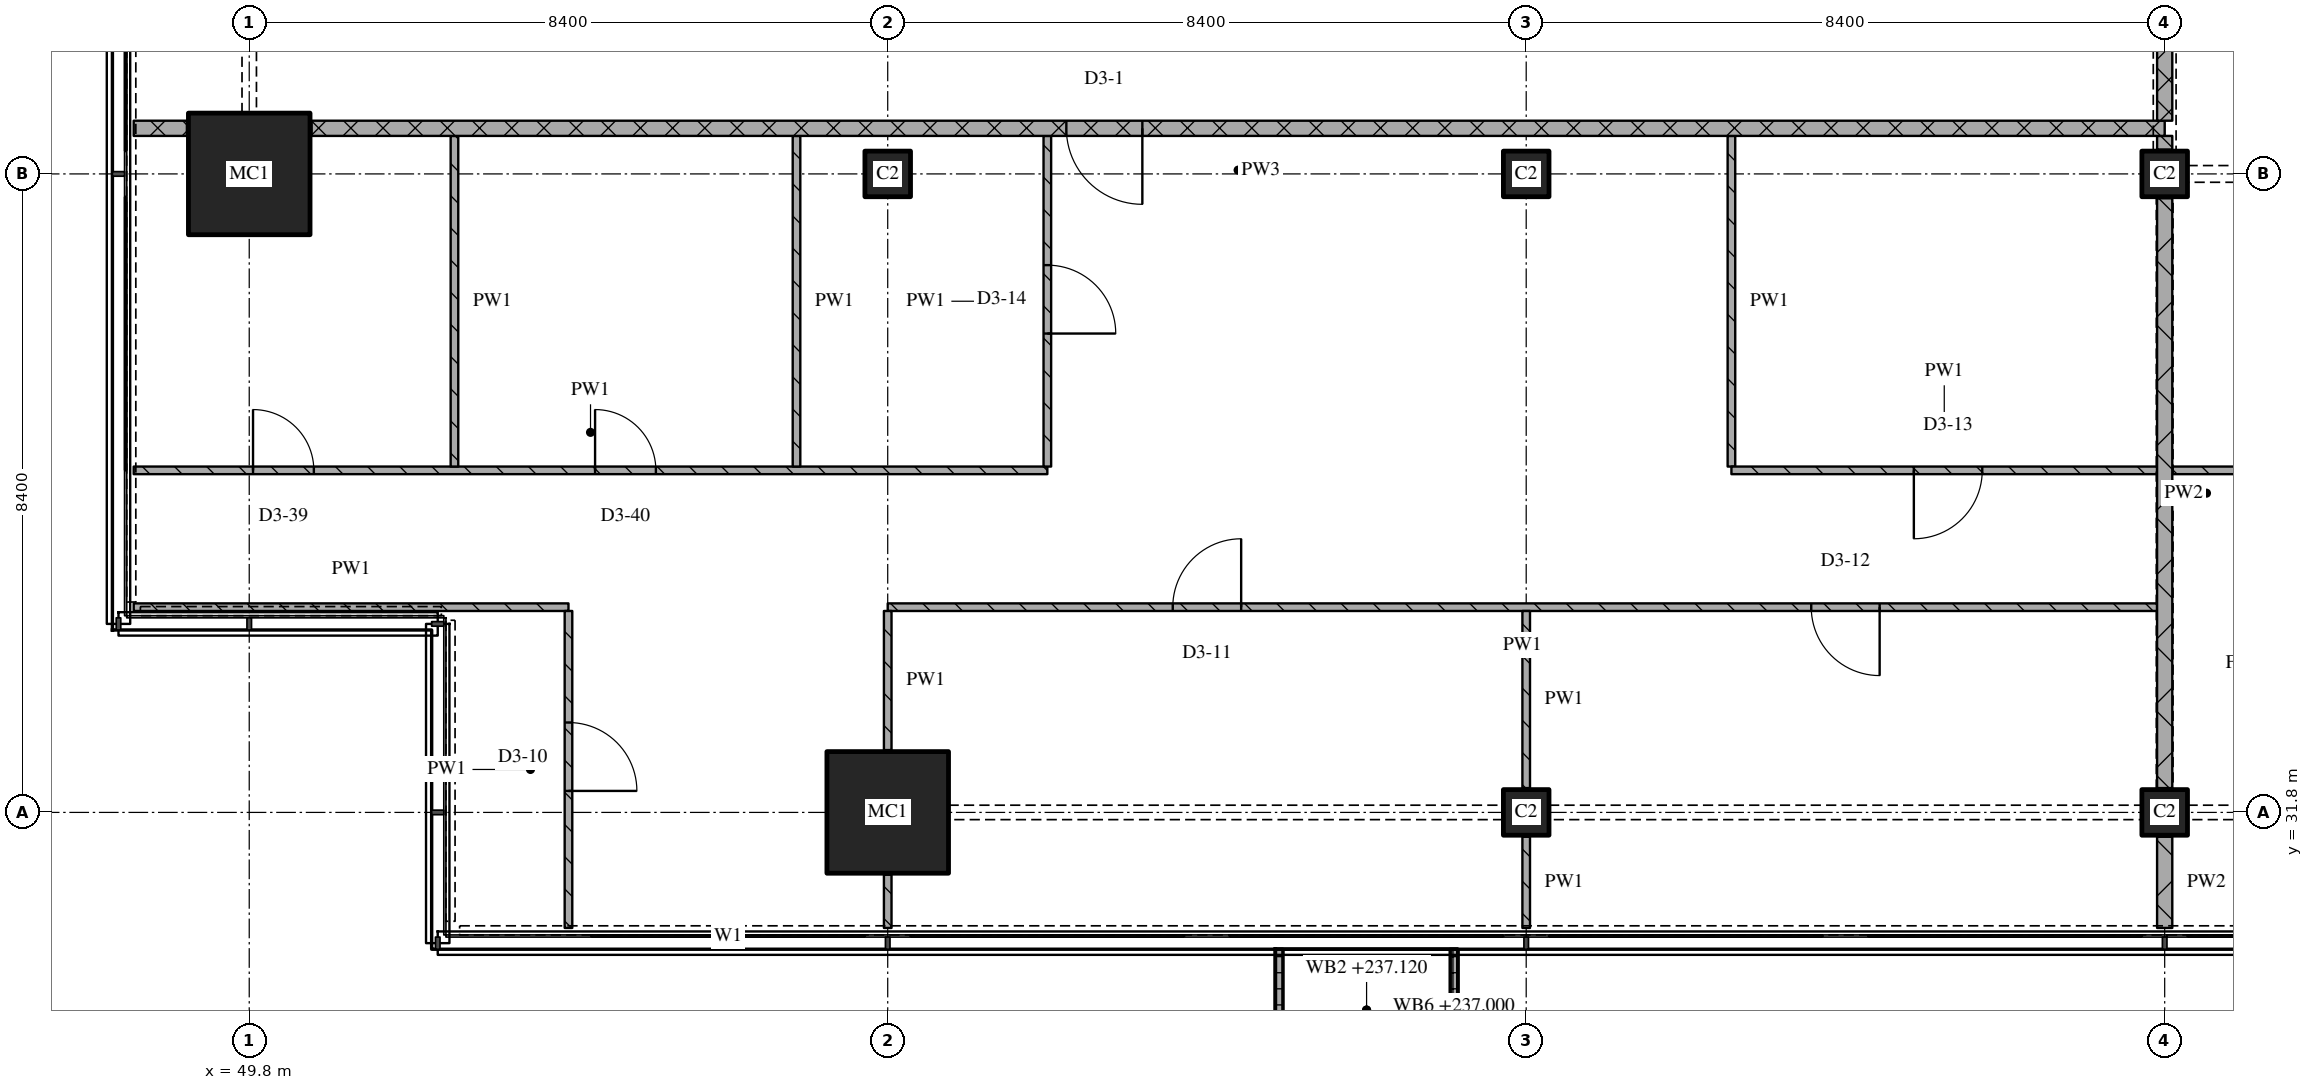
"""IFC4 building model, lengths in metres.
Left out: names, types, materials, properties, quantities, classifications, styles, units other than length and angle.
Written with IfcOpenShell. Run it as: python <this file> out.ifc"""

import sys

from ifc_helpers import new_model, si_unit, direction, frame, frame_2d, origin, origin_2d, place, context, subcontext, project, spatial, polyline, rectangle, outline, extrude, element, fill, save


model = new_model("IFC4")
c1 = context("Model", 3, precision=1e-05, world=origin(), true_north=direction((0.0, 1.0)))
c2 = subcontext(c1, "Body", "Model", "MODEL_VIEW")
j1 = project(units=[si_unit("LENGTHUNIT", "METRE"), si_unit("PLANEANGLEUNIT", "RADIAN")], contexts=[c1])
p1 = place(None, origin())
s1 = spatial("IfcSite", under=j1, at=p1, CompositionType="ELEMENT")
p2 = place(p1, origin())
s2 = spatial("IfcBuilding", under=s1, at=p2, CompositionType="ELEMENT")
p3 = place(p2, frame((0.0, 0.0, 234.3)))
s3 = spatial("IfcBuildingStorey", under=s2, at=p3, CompositionType="ELEMENT", Elevation=234.3)
for number, where, z_axis, x_axis in (
    (1, (49.8, 40.2, 0.0), (0.0, 0.0, 1.0), (1.0, 0.0, 0.0)),
    (2, (58.2, 31.8, 0.0), (0.0, 0.0, 1.0), (1.0, 0.0, 0.0)),
):
    element("IfcColumn", number, at=place(p3, frame(where, z_axis=z_axis, x_axis=x_axis)), inside=s3, PredefinedType="COLUMN", context=c2, shape_type="SweptSolid", body=[
        extrude(rectangle(XDim=1.6, YDim=1.6, at=origin_2d()), origin(), (0.0, 0.0, 1.0), 3.6),
    ])
for number, where, z_axis, x_axis in (
    (3, (58.2, 40.2, 0.0), (0.0, 0.0, 1.0), (1.0, 0.0, 0.0)),
    (4, (66.6, 31.8, 0.0), (0.0, 0.0, 1.0), (1.0, 0.0, 0.0)),
    (5, (66.6, 40.2, 0.0), (0.0, 0.0, 1.0), (1.0, 0.0, 0.0)),
    (6, (75.0, 31.8, 0.0), (0.0, 0.0, 1.0), (1.0, 0.0, 0.0)),
    (7, (75.0, 40.2, 0.0), (0.0, 0.0, 1.0), (1.0, 0.0, 0.0)),
):
    element("IfcColumn", number, at=place(p3, frame(where, z_axis=z_axis, x_axis=x_axis)), inside=s3, PredefinedType="COLUMN", context=c2, shape_type="SweptSolid", body=[
        extrude(rectangle(XDim=0.6, YDim=0.6, at=origin_2d()), origin(), (0.0, 0.0, 1.0), 3.6),
    ])
p4 = place(p3, origin())
e8 = element("IfcWall", 8, at=p4, inside=s3, PredefinedType="SOLIDWALL", context=c2, shape_type="SweptSolid", body=[
    extrude(outline(polyline([(63.3, 30.0), (63.4, 30.0), (63.4, 28.5), (65.6, 28.5), (65.6, 30.0), (65.7, 30.0), (65.7, 28.4), (63.3, 28.4), (63.3, 30.0)])), origin(), (0.0, 0.0, 1.0), 1.0),
])
p5 = place(p3, frame((48.28, 34.5, 0.0), z_axis=(0.0, 0.0, 1.0), x_axis=(1.0, 0.0, 0.0)))
e9 = element("IfcWall", 9, at=p5, inside=s3, PredefinedType="PARTITIONING", context=c2, shape_type="SweptSolid", body=[
    extrude(rectangle(XDim=5.72, YDim=0.1, at=frame_2d((2.86, 0.0))), origin(), (0.0, 0.0, 1.0), 3.32),
])
p6 = place(p3, frame((74.9, 34.5, 0.0), z_axis=(0.0, 0.0, 1.0), x_axis=(-1.0, 0.0, 0.0)))
e10 = element("IfcWall", 10, at=p6, inside=s3, PredefinedType="PARTITIONING", context=c2, shape_type="SweptSolid", body=[
    extrude(rectangle(XDim=16.7, YDim=0.1, at=frame_2d((8.35, 0.0))), origin(), (0.0, 0.0, 1.0), 3.32),
])
p7 = place(p6, frame((3.65, 0.0, 0.0)))
e11 = element("IfcOpeningElement", 11, at=p7, cuts=e10, PredefinedType="OPENING", context=c2, shape_type="SweptSolid", body=[
    extrude(rectangle(XDim=0.9, YDim=2.1, at=frame_2d((0.45, 1.05))), frame((0.0, 0.06, 0.0), z_axis=(0.0, -1.0, 0.0), x_axis=(1.0, 0.0, 0.0)), (0.0, 0.0, 1.0), 0.12),
])
p8 = place(p6, frame((12.05, 0.0, 0.0)))
e12 = element("IfcOpeningElement", 12, at=p8, cuts=e10, PredefinedType="OPENING", context=c2, shape_type="SweptSolid", body=[
    extrude(rectangle(XDim=0.9, YDim=2.1, at=frame_2d((0.45, 1.05))), frame((0.0, 0.06, 0.0), z_axis=(0.0, -1.0, 0.0), x_axis=(1.0, 0.0, 0.0)), (0.0, 0.0, 1.0), 0.12),
])
p9 = place(p3, frame((48.28, 36.3, 0.0), z_axis=(0.0, 0.0, 1.0), x_axis=(1.0, 0.0, 0.0)))
e13 = element("IfcWall", 13, at=p9, inside=s3, PredefinedType="PARTITIONING", context=c2, shape_type="SweptSolid", body=[
    extrude(rectangle(XDim=12.02, YDim=0.1, at=frame_2d((6.01, 0.0))), origin(), (0.0, 0.0, 1.0), 3.32),
])
p10 = place(p9, frame((1.57, 0.0, 0.0)))
e14 = element("IfcOpeningElement", 14, at=p10, cuts=e13, PredefinedType="OPENING", context=c2, shape_type="SweptSolid", body=[
    extrude(rectangle(XDim=0.8, YDim=2.1, at=frame_2d((0.4, 1.05))), frame((0.0, 0.06, 0.0), z_axis=(0.0, -1.0, 0.0), x_axis=(1.0, 0.0, 0.0)), (0.0, 0.0, 1.0), 0.12),
])
p11 = place(p9, frame((6.07, 0.0, 0.0)))
e15 = element("IfcOpeningElement", 15, at=p11, cuts=e13, PredefinedType="OPENING", context=c2, shape_type="SweptSolid", body=[
    extrude(rectangle(XDim=0.8, YDim=2.1, at=frame_2d((0.4, 1.05))), frame((0.0, 0.06, 0.0), z_axis=(0.0, -1.0, 0.0), x_axis=(1.0, 0.0, 0.0)), (0.0, 0.0, 1.0), 0.12),
])
p12 = place(p3, frame((48.28, 40.8, 0.0), z_axis=(0.0, 0.0, 1.0), x_axis=(1.0, 0.0, 0.0)))
e16 = element("IfcWall", 16, at=p12, inside=s3, PredefinedType="PARTITIONING", context=c2, shape_type="SweptSolid", body=[
    extrude(rectangle(XDim=0.7, YDim=0.2, at=frame_2d((0.35, 0.0))), origin(), (0.0, 0.0, 1.0), 3.32),
])
p13 = place(p3, frame((75.0, 40.8, 0.0), z_axis=(0.0, 0.0, 1.0), x_axis=(-1.0, 0.0, 0.0)))
e17 = element("IfcWall", 17, at=p13, inside=s3, PredefinedType="PARTITIONING", context=c2, shape_type="SweptSolid", body=[
    extrude(rectangle(XDim=24.38, YDim=0.2, at=frame_2d((12.19, 0.0))), origin(), (0.0, 0.0, 1.0), 3.32),
])
p14 = place(p13, frame((13.45, 0.0, 0.0)))
e18 = element("IfcOpeningElement", 18, at=p14, cuts=e17, PredefinedType="OPENING", context=c2, shape_type="SweptSolid", body=[
    extrude(rectangle(XDim=1.0, YDim=2.1, at=frame_2d((0.5, 1.05))), frame((0.0, 0.11, 0.0), z_axis=(0.0, -1.0, 0.0), x_axis=(1.0, 0.0, 0.0)), (0.0, 0.0, 1.0), 0.22),
])
p15 = place(p3, frame((52.5, 40.7, 0.0), z_axis=(0.0, 0.0, 1.0), x_axis=(0.0, -1.0, 0.0)))
e19 = element("IfcWall", 19, at=p15, inside=s3, PredefinedType="PARTITIONING", context=c2, shape_type="SweptSolid", body=[
    extrude(rectangle(XDim=4.35, YDim=0.1, at=frame_2d((2.175, 0.0))), origin(), (0.0, 0.0, 1.0), 3.32),
])
p16 = place(p3, frame((54.0, 30.28, 0.0), z_axis=(0.0, 0.0, 1.0), x_axis=(0.0, 1.0, 0.0)))
e20 = element("IfcWall", 20, at=p16, inside=s3, PredefinedType="PARTITIONING", context=c2, shape_type="SweptSolid", body=[
    extrude(rectangle(XDim=4.17, YDim=0.1, at=frame_2d((2.085, 0.0))), origin(), (0.0, 0.0, 1.0), 3.32),
])
p17 = place(p16, frame((1.803, 0.0, 0.0)))
e21 = element("IfcOpeningElement", 21, at=p17, cuts=e20, PredefinedType="OPENING", context=c2, shape_type="SweptSolid", body=[
    extrude(rectangle(XDim=0.9, YDim=2.1, at=frame_2d((0.45, 1.05))), frame((0.0, 0.06, 0.0), z_axis=(0.0, -1.0, 0.0), x_axis=(1.0, 0.0, 0.0)), (0.0, 0.0, 1.0), 0.12),
])
p18 = place(p3, frame((57.0, 40.7, 0.0), z_axis=(0.0, 0.0, 1.0), x_axis=(0.0, -1.0, 0.0)))
e22 = element("IfcWall", 22, at=p18, inside=s3, PredefinedType="PARTITIONING", context=c2, shape_type="SweptSolid", body=[
    extrude(rectangle(XDim=4.35, YDim=0.1, at=frame_2d((2.175, 0.0))), origin(), (0.0, 0.0, 1.0), 3.32),
])
p19 = place(p3, frame((58.2, 30.98, 0.0), z_axis=(0.0, 0.0, 1.0), x_axis=(0.0, -1.0, 0.0)))
e23 = element("IfcWall", 23, at=p19, inside=s3, PredefinedType="PARTITIONING", context=c2, shape_type="SweptSolid", body=[
    extrude(rectangle(XDim=0.7, YDim=0.1, at=frame_2d((0.35, 0.0))), origin(), (0.0, 0.0, 1.0), 3.32),
])
p20 = place(p3, frame((58.2, 34.45, 0.0), z_axis=(0.0, 0.0, 1.0), x_axis=(0.0, -1.0, 0.0)))
e24 = element("IfcWall", 24, at=p20, inside=s3, PredefinedType="PARTITIONING", context=c2, shape_type="SweptSolid", body=[
    extrude(rectangle(XDim=1.83, YDim=0.1, at=frame_2d((0.915, 0.0))), origin(), (0.0, 0.0, 1.0), 3.32),
])
p21 = place(p3, frame((60.3, 36.35, 0.0), z_axis=(0.0, 0.0, 1.0), x_axis=(0.0, 1.0, 0.0)))
e25 = element("IfcWall", 25, at=p21, inside=s3, PredefinedType="PARTITIONING", context=c2, shape_type="SweptSolid", body=[
    extrude(rectangle(XDim=4.35, YDim=0.1, at=frame_2d((2.175, 0.0))), origin(), (0.0, 0.0, 1.0), 3.32),
])
p22 = place(p21, frame((1.75, 0.0, 0.0)))
e26 = element("IfcOpeningElement", 26, at=p22, cuts=e25, PredefinedType="OPENING", context=c2, shape_type="SweptSolid", body=[
    extrude(rectangle(XDim=0.9, YDim=2.1, at=frame_2d((0.45, 1.05))), frame((0.0, 0.06, 0.0), z_axis=(0.0, -1.0, 0.0), x_axis=(1.0, 0.0, 0.0)), (0.0, 0.0, 1.0), 0.12),
])
p23 = place(p3, frame((66.6, 31.48, 0.0), z_axis=(0.0, 0.0, 1.0), x_axis=(0.0, -1.0, 0.0)))
e27 = element("IfcWall", 27, at=p23, inside=s3, PredefinedType="PARTITIONING", context=c2, shape_type="SweptSolid", body=[
    extrude(rectangle(XDim=1.2, YDim=0.1, at=frame_2d((0.6, 0.0))), origin(), (0.0, 0.0, 1.0), 3.32),
])
p24 = place(p3, frame((66.6, 34.45, 0.0), z_axis=(0.0, 0.0, 1.0), x_axis=(0.0, -1.0, 0.0)))
e28 = element("IfcWall", 28, at=p24, inside=s3, PredefinedType="PARTITIONING", context=c2, shape_type="SweptSolid", body=[
    extrude(rectangle(XDim=2.33, YDim=0.1, at=frame_2d((1.165, 0.0))), origin(), (0.0, 0.0, 1.0), 3.32),
])
p25 = place(p3, frame((69.3, 40.7, 0.0), z_axis=(0.0, 0.0, 1.0), x_axis=(0.0, -1.0, 0.0)))
e29 = element("IfcWall", 29, at=p25, inside=s3, PredefinedType="PARTITIONING", context=c2, shape_type="SweptSolid", body=[
    extrude(rectangle(XDim=4.35, YDim=0.1, at=frame_2d((2.175, 0.0))), origin(), (0.0, 0.0, 1.0), 3.32),
])
p26 = place(p3, frame((75.0, 43.1, 0.0), z_axis=(0.0, 0.0, 1.0), x_axis=(0.0, -1.0, 0.0)))
e30 = element("IfcWall", 30, at=p26, inside=s3, PredefinedType="PARTITIONING", context=c2, shape_type="SweptSolid", body=[
    extrude(rectangle(XDim=2.2, YDim=0.2, at=frame_2d((1.1, 0.0))), origin(), (0.0, 0.0, 1.0), 2.53),
])
p27 = place(p3, frame((75.0, 31.48, 0.0), z_axis=(0.0, 0.0, 1.0), x_axis=(0.0, -1.0, 0.0)))
e31 = element("IfcWall", 31, at=p27, inside=s3, PredefinedType="PARTITIONING", context=c2, shape_type="SweptSolid", body=[
    extrude(rectangle(XDim=1.2, YDim=0.2, at=frame_2d((0.6, 0.0))), origin(), (0.0, 0.0, 1.0), 3.32),
])
p28 = place(p3, frame((75.0, 39.88, 0.0), z_axis=(0.0, 0.0, 1.0), x_axis=(0.0, -1.0, 0.0)))
e32 = element("IfcWall", 32, at=p28, inside=s3, PredefinedType="PARTITIONING", context=c2, shape_type="SweptSolid", body=[
    extrude(rectangle(XDim=7.76, YDim=0.2, at=frame_2d((3.88, 0.0))), origin(), (0.0, 0.0, 1.0), 2.72),
])
p29 = place(p3, frame((75.0, 40.7, 0.0), z_axis=(0.0, 0.0, 1.0), x_axis=(0.0, -1.0, 0.0)))
e33 = element("IfcWall", 33, at=p29, inside=s3, PredefinedType="PARTITIONING", context=c2, shape_type="SweptSolid", body=[
    extrude(rectangle(XDim=0.18, YDim=0.2, at=frame_2d((0.09, 0.0))), origin(), (0.0, 0.0, 1.0), 3.32),
])
p30 = place(p3, frame((69.3, 36.3, 0.0), z_axis=(0.0, 0.0, 1.0), x_axis=(1.0, 0.0, 0.0)))
e34 = element("IfcWall", 34, at=p30, inside=s3, PredefinedType="PARTITIONING", context=c2, shape_type="SweptSolid", body=[
    extrude(rectangle(XDim=5.6, YDim=0.1, at=frame_2d((2.8, 0.0))), origin(), (0.0, 0.0, 1.0), 3.32),
])
p31 = place(p30, frame((2.4, 0.0, 0.0)))
e35 = element("IfcOpeningElement", 35, at=p31, cuts=e34, PredefinedType="OPENING", context=c2, shape_type="SweptSolid", body=[
    extrude(rectangle(XDim=0.9, YDim=2.1, at=frame_2d((0.45, 1.05))), frame((0.0, 0.06, 0.0), z_axis=(0.0, -1.0, 0.0), x_axis=(1.0, 0.0, 0.0)), (0.0, 0.0, 1.0), 0.12),
])
p32 = place(p3, frame((75.1, 36.3, 0.0), z_axis=(0.0, 0.0, 1.0), x_axis=(1.0, 0.0, 0.0)))
e36 = element("IfcWall", 36, at=p32, inside=s3, PredefinedType="PARTITIONING", context=c2, shape_type="SweptSolid", body=[
    extrude(rectangle(XDim=10.4, YDim=0.1, at=frame_2d((5.2, 0.0))), origin(), (0.0, 0.0, 1.0), 3.32),
])
p33 = place(p32, frame((1.42, 0.0, 0.0)))
e37 = element("IfcOpeningElement", 37, at=p33, cuts=e36, PredefinedType="OPENING", context=c2, shape_type="SweptSolid", body=[
    extrude(rectangle(XDim=0.8, YDim=2.1, at=frame_2d((0.4, 1.05))), frame((0.0, 0.06, 0.0), z_axis=(0.0, -1.0, 0.0), x_axis=(1.0, 0.0, 0.0)), (0.0, 0.0, 1.0), 0.12),
])
p34 = place(p32, frame((5.261, 0.0, 0.0)))
e38 = element("IfcOpeningElement", 38, at=p34, cuts=e36, PredefinedType="OPENING", context=c2, shape_type="SweptSolid", body=[
    extrude(rectangle(XDim=0.8, YDim=2.1, at=frame_2d((0.4, 1.05))), frame((0.0, 0.06, 0.0), z_axis=(0.0, -1.0, 0.0), x_axis=(1.0, 0.0, 0.0)), (0.0, 0.0, 1.0), 0.12),
])
p35 = place(p32, frame((8.541, 0.0, 0.0)))
e39 = element("IfcOpeningElement", 39, at=p35, cuts=e36, PredefinedType="OPENING", context=c2, shape_type="SweptSolid", body=[
    extrude(rectangle(XDim=0.9, YDim=2.1, at=frame_2d((0.45, 1.05))), frame((0.0, 0.06, 0.0), z_axis=(0.0, -1.0, 0.0), x_axis=(1.0, 0.0, 0.0)), (0.0, 0.0, 1.0), 0.12),
])
p36 = place(p7, origin())
e40 = element("IfcDoor", 40, at=p36, inside=s3, OperationType="SINGLE_SWING_LEFT", PredefinedType="DOOR", context=c2, shape_type="SweptSolid", body=[
    extrude(rectangle(XDim=0.9, YDim=2.1, at=frame_2d((0.45, 1.05))), frame((0.0, 0.025, 0.0), z_axis=(0.0, -1.0, 0.0), x_axis=(1.0, 0.0, 0.0)), (0.0, 0.0, 1.0), 0.05),
])
fill(e11, e40)
p37 = place(p8, origin())
e41 = element("IfcDoor", 41, at=p37, inside=s3, OperationType="SINGLE_SWING_RIGHT", PredefinedType="DOOR", context=c2, shape_type="SweptSolid", body=[
    extrude(rectangle(XDim=0.9, YDim=2.1, at=frame_2d((0.45, 1.05))), frame((0.0, 0.025, 0.0), z_axis=(0.0, -1.0, 0.0), x_axis=(1.0, 0.0, 0.0)), (0.0, 0.0, 1.0), 0.05),
])
fill(e12, e41)
p38 = place(p10, origin())
e42 = element("IfcDoor", 42, at=p38, inside=s3, OperationType="SINGLE_SWING_LEFT", PredefinedType="DOOR", context=c2, shape_type="SweptSolid", body=[
    extrude(rectangle(XDim=0.8, YDim=2.1, at=frame_2d((0.4, 1.05))), frame((0.0, 0.025, 0.0), z_axis=(0.0, -1.0, 0.0), x_axis=(1.0, 0.0, 0.0)), (0.0, 0.0, 1.0), 0.05),
])
fill(e14, e42)
p39 = place(p11, origin())
e43 = element("IfcDoor", 43, at=p39, inside=s3, OperationType="SINGLE_SWING_LEFT", PredefinedType="DOOR", context=c2, shape_type="SweptSolid", body=[
    extrude(rectangle(XDim=0.8, YDim=2.1, at=frame_2d((0.4, 1.05))), frame((0.0, 0.025, 0.0), z_axis=(0.0, -1.0, 0.0), x_axis=(1.0, 0.0, 0.0)), (0.0, 0.0, 1.0), 0.05),
])
fill(e15, e43)
p40 = place(p14, origin())
e44 = element("IfcDoor", 44, at=p40, inside=s3, OperationType="SINGLE_SWING_LEFT", PredefinedType="DOOR", context=c2, shape_type="SweptSolid", body=[
    extrude(rectangle(XDim=1.0, YDim=2.1, at=frame_2d((0.5, 1.05))), frame((0.0, 0.025, 0.0), z_axis=(0.0, -1.0, 0.0), x_axis=(1.0, 0.0, 0.0)), (0.0, 0.0, 1.0), 0.05),
])
fill(e18, e44)
p41 = place(p17, origin())
e45 = element("IfcDoor", 45, at=p41, inside=s3, OperationType="SINGLE_SWING_RIGHT", PredefinedType="DOOR", context=c2, shape_type="SweptSolid", body=[
    extrude(rectangle(XDim=0.9, YDim=2.1, at=frame_2d((0.45, 1.05))), frame((0.0, 0.025, 0.0), z_axis=(0.0, -1.0, 0.0), x_axis=(1.0, 0.0, 0.0)), (0.0, 0.0, 1.0), 0.05),
])
fill(e21, e45)
p42 = place(p22, origin())
e46 = element("IfcDoor", 46, at=p42, inside=s3, OperationType="SINGLE_SWING_RIGHT", PredefinedType="DOOR", context=c2, shape_type="SweptSolid", body=[
    extrude(rectangle(XDim=0.9, YDim=2.1, at=frame_2d((0.45, 1.05))), frame((0.0, 0.025, 0.0), z_axis=(0.0, -1.0, 0.0), x_axis=(1.0, 0.0, 0.0)), (0.0, 0.0, 1.0), 0.05),
])
fill(e26, e46)
p43 = place(p31, origin())
e47 = element("IfcDoor", 47, at=p43, inside=s3, OperationType="SINGLE_SWING_RIGHT", PredefinedType="DOOR", context=c2, shape_type="SweptSolid", body=[
    extrude(rectangle(XDim=0.9, YDim=2.1, at=frame_2d((0.45, 1.05))), frame((0.0, 0.025, 0.0), z_axis=(0.0, -1.0, 0.0), x_axis=(1.0, 0.0, 0.0)), (0.0, 0.0, 1.0), 0.05),
])
fill(e35, e47)
save(model, sys.argv[1])
